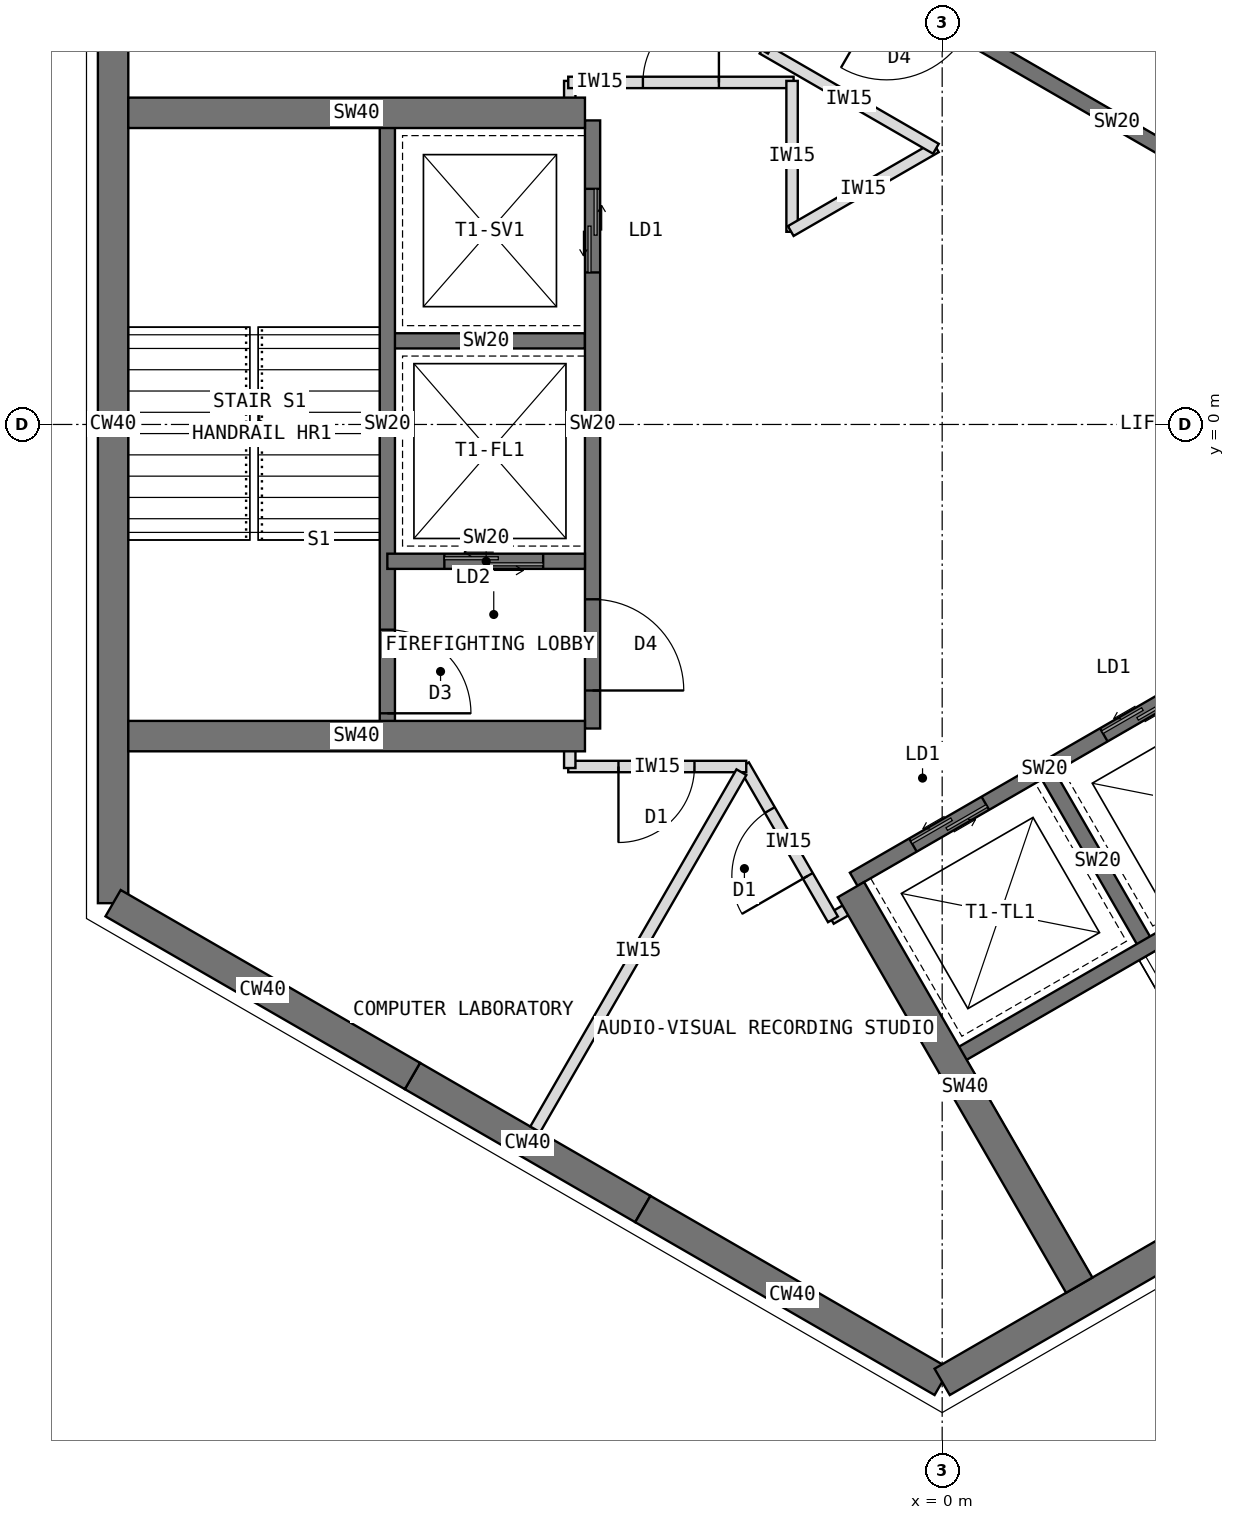
"""IFC4 building model, lengths in metres.
Left out: names, types, materials, properties, quantities, classifications, styles, units other than length and angle.
Written with IfcOpenShell. Run it as: python <this file> out.ifc"""

import sys

from ifc_helpers import new_model, si_unit, direction, frame, frame_2d, origin, place, context, subcontext, project, spatial, rectangle, extrude, element, fill, save


model = new_model("IFC4")
c1 = context("Model", 3, precision=1e-05, world=origin(), true_north=direction((0.0, 1.0)))
c2 = subcontext(c1, "Body", "Model", "MODEL_VIEW")
j1 = project(units=[si_unit("LENGTHUNIT", "METRE"), si_unit("PLANEANGLEUNIT", "RADIAN")], contexts=[c1])
p1 = place(None, origin())
s1 = spatial("IfcSite", under=j1, at=p1, CompositionType="ELEMENT")
p2 = place(p1, origin())
s2 = spatial("IfcBuilding", under=s1, at=p2, CompositionType="ELEMENT")
p3 = place(p2, frame((0.0, 0.0, 247.5)))
s3 = spatial("IfcBuildingStorey", under=s2, at=p3, CompositionType="ELEMENT", Elevation=247.5)
p4 = place(p3, frame((-10.908, 6.298, 0.0), z_axis=(0.0, 0.0, 1.0), x_axis=(0.0, -1.0, 0.0)))
e1 = element("IfcWall", 1, at=p4, inside=s3, PredefinedType="SHEAR", context=c2, shape_type="SweptSolid", body=[
    extrude(rectangle(XDim=12.596, YDim=0.4, at=frame_2d((6.298, 0.0))), origin(), (0.0, 0.0, 1.0), 4.0),
])
p5 = place(p3, frame((-10.908, -6.298, 0.0), z_axis=(0.0, 0.0, 1.0), x_axis=(0.866034513004, -0.499984222037, 0.0)))
e2 = element("IfcWall", 2, at=p5, inside=s3, PredefinedType="SHEAR", context=c2, shape_type="SweptSolid", body=[
    extrude(rectangle(XDim=4.548, YDim=0.4, at=frame_2d((2.274, 0.0))), origin(), (0.0, 0.0, 1.0), 4.0),
])
p6 = place(p3, frame((-6.97, -8.572, 0.0), z_axis=(0.0, 0.0, 1.0), x_axis=(0.866019471182, -0.500010275428, 0.0)))
e3 = element("IfcWall", 3, at=p6, inside=s3, PredefinedType="SHEAR", context=c2, shape_type="SweptSolid", body=[
    extrude(rectangle(XDim=3.5, YDim=0.4, at=frame_2d((1.75, 0.0))), origin(), (0.0, 0.0, 1.0), 4.0),
])
p7 = place(p3, frame((-3.939, -10.322, 0.0), z_axis=(0.0, 0.0, 1.0), x_axis=(0.866011268655, -0.500024481964, 0.0)))
e4 = element("IfcWall", 4, at=p7, inside=s3, PredefinedType="SHEAR", context=c2, shape_type="SweptSolid", body=[
    extrude(rectangle(XDim=4.548, YDim=0.4, at=frame_2d((2.274, 0.0))), origin(), (0.0, 0.0, 1.0), 4.0),
])
p8 = place(p3, frame((0.0, -12.596, 0.0), z_axis=(0.0, 0.0, 1.0), x_axis=(0.866021940709, 0.500005998175, 0.0)))
e5 = element("IfcWall", 5, at=p8, inside=s3, PredefinedType="SHEAR", context=c2, shape_type="SweptSolid", body=[
    extrude(rectangle(XDim=12.596, YDim=0.4, at=frame_2d((6.298, 0.0))), origin(), (0.0, 0.0, 1.0), 4.0),
])
p9 = place(p3, frame((5.764, 1.984, 0.0), z_axis=(0.0, 0.0, 1.0), x_axis=(-0.866026010844, 0.49999894854, 0.0)))
e6 = element("IfcWall", 6, at=p9, inside=s3, PredefinedType="SHEAR", context=c2, shape_type="SweptSolid", body=[
    extrude(rectangle(XDim=8.0, YDim=0.2, at=frame_2d((4.0, 0.0))), origin(), (0.0, 0.0, 1.0), 4.0),
])
p10 = place(p9, frame((6.3, 0.0, 0.0)))
e7 = element("IfcOpeningElement", 7, at=p10, cuts=e6, PredefinedType="OPENING", context=c2, shape_type="SweptSolid", body=[
    extrude(rectangle(XDim=1.2, YDim=2.1, at=frame_2d((0.6, 1.05))), frame((0.0, 0.11, 0.0), z_axis=(0.0, -1.0, 0.0), x_axis=(1.0, 0.0, 0.0)), (0.0, 0.0, 1.0), 0.22),
])
p11 = place(p3, frame((7.114, 4.322, 0.0), z_axis=(0.0, 0.0, 1.0), x_axis=(-0.866026010844, 0.49999894854, 0.0)))
e8 = element("IfcWall", 8, at=p11, inside=s3, PredefinedType="SHEAR", context=c2, shape_type="SweptSolid", body=[
    extrude(rectangle(XDim=8.0, YDim=0.2, at=frame_2d((4.0, 0.0))), origin(), (0.0, 0.0, 1.0), 4.0),
])
p12 = place(p11, frame((6.8, 0.0, 0.0)))
e9 = element("IfcOpeningElement", 9, at=p12, cuts=e8, PredefinedType="OPENING", context=c2, shape_type="SweptSolid", body=[
    extrude(rectangle(XDim=0.9, YDim=2.1, at=frame_2d((0.45, 1.05))), frame((0.0, 0.11, 0.0), z_axis=(0.0, -1.0, 0.0), x_axis=(1.0, 0.0, 0.0)), (0.0, 0.0, 1.0), 0.22),
])
p13 = place(p3, frame((-4.6, 4.0, 0.0), z_axis=(0.0, 0.0, 1.0), x_axis=(0.0, -1.0, 0.0)))
e10 = element("IfcWall", 10, at=p13, inside=s3, PredefinedType="SHEAR", context=c2, shape_type="SweptSolid", body=[
    extrude(rectangle(XDim=8.0, YDim=0.2, at=frame_2d((4.0, 0.0))), origin(), (0.0, 0.0, 1.0), 4.0),
])
p14 = place(p13, frame((6.3, 0.0, 0.0)))
e11 = element("IfcOpeningElement", 11, at=p14, cuts=e10, PredefinedType="OPENING", context=c2, shape_type="SweptSolid", body=[
    extrude(rectangle(XDim=1.2, YDim=2.1, at=frame_2d((0.6, 1.05))), frame((0.0, 0.11, 0.0), z_axis=(0.0, -1.0, 0.0), x_axis=(1.0, 0.0, 0.0)), (0.0, 0.0, 1.0), 0.22),
])
p15 = place(p13, frame((0.9, 0.0, 0.0)))
e12 = element("IfcOpeningElement", 12, at=p15, cuts=e10, PredefinedType="OPENING", context=c2, shape_type="SweptSolid", body=[
    extrude(rectangle(XDim=1.1, YDim=2.2, at=frame_2d((0.55, 1.1))), frame((0.0, 0.11, 0.0), z_axis=(0.0, -1.0, 0.0), x_axis=(1.0, 0.0, 0.0)), (0.0, 0.0, 1.0), 0.22),
])
p16 = place(p3, frame((-4.7, 1.1, 0.0), z_axis=(0.0, 0.0, 1.0), x_axis=(-1.0, 0.0, 0.0)))
e13 = element("IfcWall", 13, at=p16, inside=s3, PredefinedType="SHEAR", context=c2, shape_type="SweptSolid", body=[
    extrude(rectangle(XDim=2.6, YDim=0.2, at=frame_2d((1.3, 0.0))), origin(), (0.0, 0.0, 1.0), 4.0),
])
p17 = place(p3, frame((-4.7, -1.8, 0.0), z_axis=(0.0, 0.0, 1.0), x_axis=(-1.0, 0.0, 0.0)))
e14 = element("IfcWall", 14, at=p17, inside=s3, PredefinedType="SHEAR", context=c2, shape_type="SweptSolid", body=[
    extrude(rectangle(XDim=2.6, YDim=0.2, at=frame_2d((1.3, 0.0))), origin(), (0.0, 0.0, 1.0), 4.0),
])
p18 = place(p17, frame((0.55, 0.0, 0.0)))
e15 = element("IfcOpeningElement", 15, at=p18, cuts=e14, PredefinedType="OPENING", context=c2, shape_type="SweptSolid", body=[
    extrude(rectangle(XDim=1.3, YDim=2.2, at=frame_2d((0.65, 1.1))), frame((0.0, 0.11, 0.0), z_axis=(0.0, -1.0, 0.0), x_axis=(1.0, 0.0, 0.0)), (0.0, 0.0, 1.0), 0.22),
])
p19 = place(p3, frame((-7.3, 4.0, 0.0), z_axis=(0.0, 0.0, 1.0), x_axis=(0.0, -1.0, 0.0)))
e16 = element("IfcWall", 16, at=p19, inside=s3, PredefinedType="SHEAR", context=c2, shape_type="SweptSolid", body=[
    extrude(rectangle(XDim=8.0, YDim=0.2, at=frame_2d((4.0, 0.0))), origin(), (0.0, 0.0, 1.0), 4.0),
])
p20 = place(p19, frame((6.7, 0.0, 0.0)))
e17 = element("IfcOpeningElement", 17, at=p20, cuts=e16, PredefinedType="OPENING", context=c2, shape_type="SweptSolid", body=[
    extrude(rectangle(XDim=1.1, YDim=2.1, at=frame_2d((0.55, 1.05))), frame((0.0, 0.11, 0.0), z_axis=(0.0, -1.0, 0.0), x_axis=(1.0, 0.0, 0.0)), (0.0, 0.0, 1.0), 0.22),
])
for number, where, z_axis, x_axis in (
    (18, (-4.7, -4.1, 0.0), (0.0, 0.0, 1.0), (-1.0, 0.0, 0.0)),
    (19, (-4.7, 4.1, 0.0), (0.0, 0.0, 1.0), (-1.0, 0.0, 0.0)),
):
    element("IfcWall", number, at=place(p3, frame(where, z_axis=z_axis, x_axis=x_axis)), inside=s3, PredefinedType="SHEAR", context=c2, shape_type="SweptSolid", body=[
        extrude(rectangle(XDim=6.008, YDim=0.4, at=frame_2d((3.004, 0.0))), origin(), (0.0, 0.0, 1.0), 4.0),
    ])
p21 = place(p3, frame((-1.164, -5.984, 0.0), z_axis=(0.0, 0.0, 1.0), x_axis=(0.866026010844, 0.49999894854, 0.0)))
e20 = element("IfcWall", 20, at=p21, inside=s3, PredefinedType="SHEAR", context=c2, shape_type="SweptSolid", body=[
    extrude(rectangle(XDim=8.0, YDim=0.2, at=frame_2d((4.0, 0.0))), origin(), (0.0, 0.0, 1.0), 4.0),
])
p22 = place(p21, frame((6.3, 0.0, 0.0)))
e21 = element("IfcOpeningElement", 21, at=p22, cuts=e20, PredefinedType="OPENING", context=c2, shape_type="SweptSolid", body=[
    extrude(rectangle(XDim=1.2, YDim=2.1, at=frame_2d((0.6, 1.05))), frame((0.0, 0.11, 0.0), z_axis=(0.0, -1.0, 0.0), x_axis=(1.0, 0.0, 0.0)), (0.0, 0.0, 1.0), 0.22),
])
p23 = place(p21, frame((0.9, 0.0, 0.0)))
e22 = element("IfcOpeningElement", 22, at=p23, cuts=e20, PredefinedType="OPENING", context=c2, shape_type="SweptSolid", body=[
    extrude(rectangle(XDim=1.1, YDim=2.2, at=frame_2d((0.55, 1.1))), frame((0.0, 0.11, 0.0), z_axis=(0.0, -1.0, 0.0), x_axis=(1.0, 0.0, 0.0)), (0.0, 0.0, 1.0), 0.22),
])
p24 = place(p21, frame((3.8, 0.0, 0.0)))
e23 = element("IfcOpeningElement", 23, at=p24, cuts=e20, PredefinedType="OPENING", context=c2, shape_type="SweptSolid", body=[
    extrude(rectangle(XDim=1.1, YDim=2.2, at=frame_2d((0.55, 1.1))), frame((0.0, 0.11, 0.0), z_axis=(0.0, -1.0, 0.0), x_axis=(1.0, 0.0, 0.0)), (0.0, 0.0, 1.0), 0.22),
])
p25 = place(p3, frame((1.397, -4.62, 0.0), z_axis=(0.0, 0.0, 1.0), x_axis=(0.499936506574, -0.866062058628, 0.0)))
e24 = element("IfcWall", 24, at=p25, inside=s3, PredefinedType="SHEAR", context=c2, shape_type="SweptSolid", body=[
    extrude(rectangle(XDim=2.6, YDim=0.2, at=frame_2d((1.3, 0.0))), origin(), (0.0, 0.0, 1.0), 4.0),
])
p26 = place(p3, frame((0.186, -8.322, 0.0), z_axis=(0.0, 0.0, 1.0), x_axis=(0.866026010844, 0.49999894854, 0.0)))
e25 = element("IfcWall", 25, at=p26, inside=s3, PredefinedType="SHEAR", context=c2, shape_type="SweptSolid", body=[
    extrude(rectangle(XDim=8.0, YDim=0.2, at=frame_2d((4.0, 0.0))), origin(), (0.0, 0.0, 1.0), 4.0),
])
p27 = place(p26, frame((6.7, 0.0, 0.0)))
e26 = element("IfcOpeningElement", 26, at=p27, cuts=e25, PredefinedType="OPENING", context=c2, shape_type="SweptSolid", body=[
    extrude(rectangle(XDim=1.1, YDim=2.1, at=frame_2d((0.55, 1.05))), frame((0.0, 0.11, 0.0), z_axis=(0.0, -1.0, 0.0), x_axis=(1.0, 0.0, 0.0)), (0.0, 0.0, 1.0), 0.22),
])
p28 = place(p3, frame((-1.201, -6.12, 0.0), z_axis=(0.0, 0.0, 1.0), x_axis=(0.499997979876, -0.866026570101, 0.0)))
e27 = element("IfcWall", 27, at=p28, inside=s3, PredefinedType="SHEAR", context=c2, shape_type="SweptSolid", body=[
    extrude(rectangle(XDim=6.008, YDim=0.4, at=frame_2d((3.004, 0.0))), origin(), (0.0, 0.0, 1.0), 4.0),
])
p29 = place(p3, frame((-1.092, -6.289, 0.0), z_axis=(0.0, 0.0, 1.0), x_axis=(-0.866138304741, -0.499804398801, 0.0)))
e28 = element("IfcWall", 28, at=p29, inside=s3, PredefinedType="PARTITIONING", context=c2, shape_type="SweptSolid", body=[
    extrude(rectangle(XDim=0.43, YDim=0.15, at=frame_2d((0.215, 0.0))), origin(), (0.0, 0.0, 1.0), 3.8),
])
p30 = place(p3, frame((-1.437, -6.511, 0.0), z_axis=(0.0, 0.0, 1.0), x_axis=(-0.500074377092, 0.865982457891, 0.0)))
e29 = element("IfcWall", 29, at=p30, inside=s3, PredefinedType="PARTITIONING", context=c2, shape_type="SweptSolid", body=[
    extrude(rectangle(XDim=2.342, YDim=0.15, at=frame_2d((1.171, 0.0))), origin(), (0.0, 0.0, 1.0), 3.8),
])
p31 = place(p30, frame((0.661, 0.0, 0.0)))
e30 = element("IfcOpeningElement", 30, at=p31, cuts=e29, PredefinedType="OPENING", context=c2, shape_type="SweptSolid", body=[
    extrude(rectangle(XDim=1.0, YDim=2.1, at=frame_2d((0.5, 1.05))), frame((0.0, 0.085, 0.0), z_axis=(0.0, -1.0, 0.0), x_axis=(1.0, 0.0, 0.0)), (0.0, 0.0, 1.0), 0.17),
])
p32 = place(p3, frame((-2.578, -4.5, 0.0), z_axis=(0.0, 0.0, 1.0), x_axis=(-1.0, 0.0, 0.0)))
e31 = element("IfcWall", 31, at=p32, inside=s3, PredefinedType="PARTITIONING", context=c2, shape_type="SweptSolid", body=[
    extrude(rectangle(XDim=2.342, YDim=0.15, at=frame_2d((1.171, 0.0))), origin(), (0.0, 0.0, 1.0), 3.8),
])
p33 = place(p32, frame((0.681, 0.0, 0.0)))
e32 = element("IfcOpeningElement", 32, at=p33, cuts=e31, PredefinedType="OPENING", context=c2, shape_type="SweptSolid", body=[
    extrude(rectangle(XDim=1.0, YDim=2.1, at=frame_2d((0.5, 1.05))), frame((0.0, 0.085, 0.0), z_axis=(0.0, -1.0, 0.0), x_axis=(1.0, 0.0, 0.0)), (0.0, 0.0, 1.0), 0.17),
])
for number, where, z_axis, x_axis in (
    (33, (-4.9, -4.52, 0.0), (0.0, 0.0, 1.0), (0.0, 1.0, 0.0)),
    (34, (-4.9, 4.09, 0.0), (0.0, 0.0, 1.0), (0.0, 1.0, 0.0)),
):
    element("IfcWall", number, at=place(p3, frame(where, z_axis=z_axis, x_axis=x_axis)), inside=s3, PredefinedType="PARTITIONING", context=c2, shape_type="SweptSolid", body=[
        extrude(rectangle(XDim=0.43, YDim=0.15, at=frame_2d((0.215, 0.0))), origin(), (0.0, 0.0, 1.0), 3.8),
    ])
p34 = place(p3, frame((-4.92, 4.5, 0.0), z_axis=(0.0, 0.0, 1.0), x_axis=(1.0, 0.0, 0.0)))
e35 = element("IfcWall", 35, at=p34, inside=s3, PredefinedType="PARTITIONING", context=c2, shape_type="SweptSolid", body=[
    extrude(rectangle(XDim=2.965, YDim=0.15, at=frame_2d((1.482, 0.0))), origin(), (0.0, 0.0, 1.0), 3.8),
])
p35 = place(p34, frame((0.982, 0.0, 0.0)))
e36 = element("IfcOpeningElement", 36, at=p35, cuts=e35, PredefinedType="OPENING", context=c2, shape_type="SweptSolid", body=[
    extrude(rectangle(XDim=1.0, YDim=2.1, at=frame_2d((0.5, 1.05))), frame((0.0, 0.085, 0.0), z_axis=(0.0, -1.0, 0.0), x_axis=(1.0, 0.0, 0.0)), (0.0, 0.0, 1.0), 0.17),
])
p36 = place(p3, frame((-1.975, 4.52, 0.0), z_axis=(0.0, 0.0, 1.0), x_axis=(0.0, -1.0, 0.0)))
e37 = element("IfcWall", 37, at=p36, inside=s3, PredefinedType="PARTITIONING", context=c2, shape_type="SweptSolid", body=[
    extrude(rectangle(XDim=1.985, YDim=0.15, at=frame_2d((0.993, 0.0))), origin(), (0.0, 0.0, 1.0), 3.8),
])
p37 = place(p3, frame((-1.992, 2.545, 0.0), z_axis=(0.0, 0.0, 1.0), x_axis=(0.866074964767, 0.499914148034, 0.0)))
e38 = element("IfcWall", 38, at=p37, inside=s3, PredefinedType="PARTITIONING", context=c2, shape_type="SweptSolid", body=[
    extrude(rectangle(XDim=2.205, YDim=0.15, at=frame_2d((1.103, 0.0))), origin(), (0.0, 0.0, 1.0), 3.8),
])
p38 = place(p3, frame((-0.083, 3.627, 0.0), z_axis=(0.0, 0.0, 1.0), x_axis=(-0.866022017938, 0.500005864412, 0.0)))
e39 = element("IfcWall", 39, at=p38, inside=s3, PredefinedType="PARTITIONING", context=c2, shape_type="SweptSolid", body=[
    extrude(rectangle(XDim=2.635, YDim=0.15, at=frame_2d((1.317, 0.0))), origin(), (0.0, 0.0, 1.0), 3.8),
])
p39 = place(p3, frame((-2.357, 4.917, 0.0), z_axis=(0.0, 0.0, 1.0), x_axis=(0.500120627516, 0.865955748254, 0.0)))
e40 = element("IfcWall", 40, at=p39, inside=s3, PredefinedType="PARTITIONING", context=c2, shape_type="SweptSolid", body=[
    extrude(rectangle(XDim=1.84, YDim=0.15, at=frame_2d((0.92, 0.0))), origin(), (0.0, 0.0, 1.0), 3.8),
])
p40 = place(p3, frame((-2.641, -4.575, 0.0), z_axis=(0.0, 0.0, 1.0), x_axis=(-0.500010688608, -0.866019232626, 0.0)))
e41 = element("IfcWall", 41, at=p40, inside=s3, PredefinedType="PARTITIONING", context=c2, shape_type="SweptSolid", body=[
    extrude(rectangle(XDim=5.426, YDim=0.15, at=frame_2d((2.713, 0.0))), origin(), (0.0, 0.0, 1.0), 3.8),
])
p41 = place(p14, origin())
e42 = element("IfcDoor", 42, at=p41, inside=s3, OperationType="SINGLE_SWING_RIGHT", PredefinedType="DOOR", context=c2, shape_type="SweptSolid", body=[
    extrude(rectangle(XDim=1.2, YDim=2.1, at=frame_2d((0.6, 1.05))), frame((0.0, 0.025, 0.0), z_axis=(0.0, -1.0, 0.0), x_axis=(1.0, 0.0, 0.0)), (0.0, 0.0, 1.0), 0.05),
])
fill(e11, e42)
p42 = place(p18, origin())
e43 = element("IfcDoor", 43, at=p42, inside=s3, OperationType="DOUBLE_DOOR_SLIDING", PredefinedType="DOOR", context=c2, shape_type="SweptSolid", body=[
    extrude(rectangle(XDim=1.3, YDim=2.2, at=frame_2d((0.65, 1.1))), frame((0.0, 0.025, 0.0), z_axis=(0.0, -1.0, 0.0), x_axis=(1.0, 0.0, 0.0)), (0.0, 0.0, 1.0), 0.05),
])
fill(e15, e43)
p43 = place(p15, origin())
e44 = element("IfcDoor", 44, at=p43, inside=s3, OperationType="DOUBLE_DOOR_SLIDING", PredefinedType="DOOR", context=c2, shape_type="SweptSolid", body=[
    extrude(rectangle(XDim=1.1, YDim=2.2, at=frame_2d((0.55, 1.1))), frame((0.0, 0.025, 0.0), z_axis=(0.0, -1.0, 0.0), x_axis=(1.0, 0.0, 0.0)), (0.0, 0.0, 1.0), 0.05),
])
fill(e12, e44)
p44 = place(p20, origin())
e45 = element("IfcDoor", 45, at=p44, inside=s3, OperationType="SINGLE_SWING_RIGHT", PredefinedType="DOOR", context=c2, shape_type="SweptSolid", body=[
    extrude(rectangle(XDim=1.1, YDim=2.1, at=frame_2d((0.55, 1.05))), frame((0.0, 0.025, 0.0), z_axis=(0.0, -1.0, 0.0), x_axis=(1.0, 0.0, 0.0)), (0.0, 0.0, 1.0), 0.05),
])
fill(e17, e45)
p45 = place(p23, origin())
e46 = element("IfcDoor", 46, at=p45, inside=s3, OperationType="DOUBLE_DOOR_SLIDING", PredefinedType="DOOR", context=c2, shape_type="SweptSolid", body=[
    extrude(rectangle(XDim=1.1, YDim=2.2, at=frame_2d((0.55, 1.1))), frame((0.0, 0.025, 0.0), z_axis=(0.0, -1.0, 0.0), x_axis=(1.0, 0.0, 0.0)), (0.0, 0.0, 1.0), 0.05),
])
fill(e22, e46)
p46 = place(p24, origin())
e47 = element("IfcDoor", 47, at=p46, inside=s3, OperationType="DOUBLE_DOOR_SLIDING", PredefinedType="DOOR", context=c2, shape_type="SweptSolid", body=[
    extrude(rectangle(XDim=1.1, YDim=2.2, at=frame_2d((0.55, 1.1))), frame((0.0, 0.025, 0.0), z_axis=(0.0, -1.0, 0.0), x_axis=(1.0, 0.0, 0.0)), (0.0, 0.0, 1.0), 0.05),
])
fill(e23, e47)
p47 = place(p33, origin())
e48 = element("IfcDoor", 48, at=p47, inside=s3, OperationType="SINGLE_SWING_RIGHT", PredefinedType="DOOR", context=c2, shape_type="SweptSolid", body=[
    extrude(rectangle(XDim=1.0, YDim=2.1, at=frame_2d((0.5, 1.05))), frame((0.0, 0.025, 0.0), z_axis=(0.0, -1.0, 0.0), x_axis=(1.0, 0.0, 0.0)), (0.0, 0.0, 1.0), 0.05),
])
fill(e32, e48)
p48 = place(p31, origin())
e49 = element("IfcDoor", 49, at=p48, inside=s3, OperationType="SINGLE_SWING_LEFT", PredefinedType="DOOR", context=c2, shape_type="SweptSolid", body=[
    extrude(rectangle(XDim=1.0, YDim=2.1, at=frame_2d((0.5, 1.05))), frame((0.0, 0.025, 0.0), z_axis=(0.0, -1.0, 0.0), x_axis=(1.0, 0.0, 0.0)), (0.0, 0.0, 1.0), 0.05),
])
fill(e30, e49)
p49 = place(p35, origin())
e50 = element("IfcDoor", 50, at=p49, inside=s3, OperationType="SINGLE_SWING_RIGHT", PredefinedType="DOOR", context=c2, shape_type="SweptSolid", body=[
    extrude(rectangle(XDim=1.0, YDim=2.1, at=frame_2d((0.5, 1.05))), frame((0.0, 0.025, 0.0), z_axis=(0.0, -1.0, 0.0), x_axis=(1.0, 0.0, 0.0)), (0.0, 0.0, 1.0), 0.05),
])
fill(e36, e50)
save(model, sys.argv[1])
